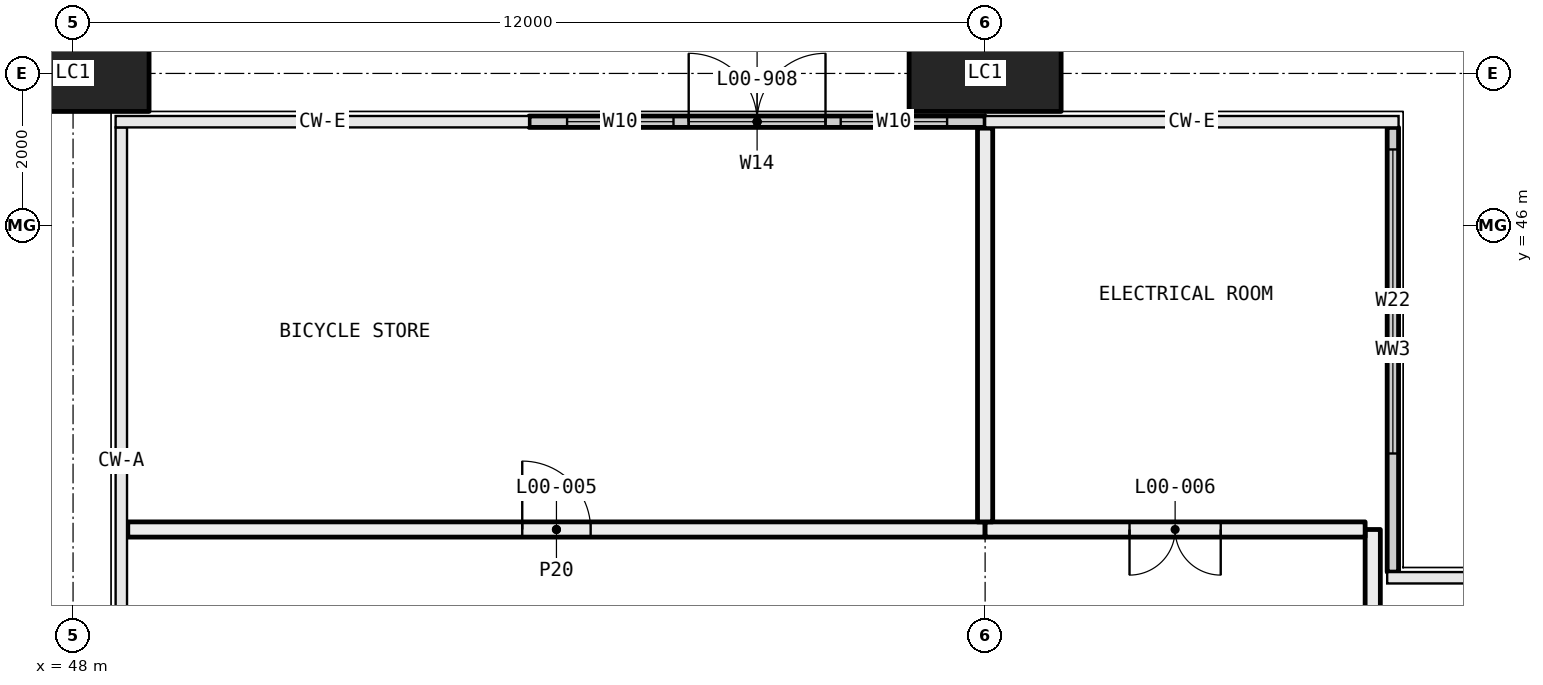
"""IFC4 building model, lengths in metres.
Left out: names, types, materials, properties, quantities, classifications, styles, units other than length and angle.
Written with IfcOpenShell. Run it as: python <this file> out.ifc"""

import sys

from ifc_helpers import new_model, si_unit, direction, frame, frame_2d, origin, origin_2d, place, context, subcontext, project, spatial, rectangle, hollow_rectangle, extrude, element, fill, save


model = new_model("IFC4")
c1 = context("Model", 3, precision=1e-05, world=origin(), true_north=direction((0.0, 1.0)))
c2 = subcontext(c1, "Body", "Model", "MODEL_VIEW")
j1 = project(units=[si_unit("LENGTHUNIT", "METRE"), si_unit("PLANEANGLEUNIT", "RADIAN")], contexts=[c1])
p1 = place(None, origin())
s1 = spatial("IfcSite", under=j1, at=p1, CompositionType="ELEMENT")
p2 = place(p1, origin())
s2 = spatial("IfcBuilding", under=s1, at=p2, CompositionType="ELEMENT")
p3 = place(p2, origin())
s3 = spatial("IfcBuildingStorey", under=s2, at=p3, CompositionType="ELEMENT", Elevation=0.0)
for number, where, z_axis, x_axis in (
    (1, (48.0, 48.0, -0.9), (0.0, 0.0, 1.0), (1.0, 0.0, 0.0)),
    (2, (60.0, 48.0, -0.9), (0.0, 0.0, 1.0), (1.0, 0.0, 0.0)),
):
    element("IfcColumn", number, at=place(p3, frame(where, z_axis=z_axis, x_axis=x_axis)), inside=s3, PredefinedType="COLUMN", context=c2, shape_type="SweptSolid", body=[
        extrude(hollow_rectangle(XDim=2.0, YDim=1.0, WallThickness=0.08, at=origin_2d()), origin(), (0.0, 0.0, 1.0), 6.5),
    ])
p4 = place(p3, frame((65.365, 41.44, 0.0), z_axis=(0.0, 0.0, 1.0), x_axis=(0.0, 1.0, 0.0)))
e3 = element("IfcWall", 3, at=p4, inside=s3, PredefinedType="ELEMENTEDWALL", context=c2, shape_type="SweptSolid", body=[
    extrude(rectangle(XDim=5.85, YDim=0.15, at=frame_2d((2.925, 0.0))), origin(), (0.0, 0.0, 1.0), 5.6),
])
p5 = place(p4, frame((1.56, 0.0, 0.45)))
e4 = element("IfcOpeningElement", 4, at=p5, cuts=e3, PredefinedType="OPENING", context=c2, shape_type="SweptSolid", body=[
    extrude(rectangle(XDim=4.0, YDim=5.1, at=frame_2d((2.0, 2.55))), frame((0.0, 0.085, 0.0), z_axis=(0.0, -1.0, 0.0), x_axis=(1.0, 0.0, 0.0)), (0.0, 0.0, 1.0), 0.17),
])
p6 = place(p3, frame((54.0, 47.365, 0.0), z_axis=(0.0, 0.0, 1.0), x_axis=(1.0, 0.0, 0.0)))
e5 = element("IfcWall", 5, at=p6, inside=s3, PredefinedType="ELEMENTEDWALL", context=c2, shape_type="SweptSolid", body=[
    extrude(rectangle(XDim=6.0, YDim=0.15, at=frame_2d((3.0, 0.0))), origin(), (0.0, 0.0, 1.0), 5.6),
])
p7 = place(p6, frame((0.5, 0.0, 0.45)))
e6 = element("IfcOpeningElement", 6, at=p7, cuts=e5, PredefinedType="OPENING", context=c2, shape_type="SweptSolid", body=[
    extrude(rectangle(XDim=1.4, YDim=5.1, at=frame_2d((0.7, 2.55))), frame((0.0, 0.085, 0.0), z_axis=(0.0, -1.0, 0.0), x_axis=(1.0, 0.0, 0.0)), (0.0, 0.0, 1.0), 0.17),
])
p8 = place(p6, frame((4.1, 0.0, 0.45)))
e7 = element("IfcOpeningElement", 7, at=p8, cuts=e5, PredefinedType="OPENING", context=c2, shape_type="SweptSolid", body=[
    extrude(rectangle(XDim=1.4, YDim=5.1, at=frame_2d((0.7, 2.55))), frame((0.0, 0.085, 0.0), z_axis=(0.0, -1.0, 0.0), x_axis=(1.0, 0.0, 0.0)), (0.0, 0.0, 1.0), 0.17),
])
p9 = place(p6, frame((2.1, 0.0, 0.0)))
e8 = element("IfcOpeningElement", 8, at=p9, cuts=e5, PredefinedType="OPENING", context=c2, shape_type="SweptSolid", body=[
    extrude(rectangle(XDim=1.8, YDim=2.4, at=frame_2d((0.9, 1.2))), frame((0.0, 0.085, 0.0), z_axis=(0.0, -1.0, 0.0), x_axis=(1.0, 0.0, 0.0)), (0.0, 0.0, 1.0), 0.17),
])
p10 = place(p6, frame((2.1, 0.0, 2.6)))
e9 = element("IfcOpeningElement", 9, at=p10, cuts=e5, PredefinedType="OPENING", context=c2, shape_type="SweptSolid", body=[
    extrude(rectangle(XDim=1.8, YDim=2.95, at=frame_2d((0.9, 1.475))), frame((0.0, 0.085, 0.0), z_axis=(0.0, -1.0, 0.0), x_axis=(1.0, 0.0, 0.0)), (0.0, 0.0, 1.0), 0.17),
])
p11 = place(p3, frame((65.1, 36.1, 0.0), z_axis=(0.0, 0.0, 1.0), x_axis=(0.0, 1.0, 0.0)))
e10 = element("IfcWall", 10, at=p11, inside=s3, PredefinedType="PARTITIONING", context=c2, shape_type="SweptSolid", body=[
    extrude(rectangle(XDim=5.9, YDim=0.2, at=frame_2d((2.95, 0.0))), origin(), (0.0, 0.0, 1.0), 5.6),
])
p12 = place(p3, frame((60.0, 42.0, 0.0), z_axis=(0.0, 0.0, 1.0), x_axis=(-1.0, 0.0, 0.0)))
e11 = element("IfcWall", 11, at=p12, inside=s3, PredefinedType="PARTITIONING", context=c2, shape_type="SweptSolid", body=[
    extrude(rectangle(XDim=11.28, YDim=0.2, at=frame_2d((5.64, 0.0))), origin(), (0.0, 0.0, 1.0), 5.6),
])
p13 = place(p12, frame((5.19, 0.0, 0.0)))
e12 = element("IfcOpeningElement", 12, at=p13, cuts=e11, PredefinedType="OPENING", context=c2, shape_type="SweptSolid", body=[
    extrude(rectangle(XDim=0.9, YDim=2.1, at=frame_2d((0.45, 1.05))), frame((0.0, 0.11, 0.0), z_axis=(0.0, -1.0, 0.0), x_axis=(1.0, 0.0, 0.0)), (0.0, 0.0, 1.0), 0.22),
])
p14 = place(p3, frame((65.0, 42.0, 0.0), z_axis=(0.0, 0.0, 1.0), x_axis=(-1.0, 0.0, 0.0)))
e13 = element("IfcWall", 13, at=p14, inside=s3, PredefinedType="PARTITIONING", context=c2, shape_type="SweptSolid", body=[
    extrude(rectangle(XDim=5.0, YDim=0.2, at=frame_2d((2.5, 0.0))), origin(), (0.0, 0.0, 1.0), 5.6),
])
p15 = place(p14, frame((1.9, 0.0, 0.0)))
e14 = element("IfcOpeningElement", 14, at=p15, cuts=e13, PredefinedType="OPENING", context=c2, shape_type="SweptSolid", body=[
    extrude(rectangle(XDim=1.2, YDim=2.1, at=frame_2d((0.6, 1.05))), frame((0.0, 0.11, 0.0), z_axis=(0.0, -1.0, 0.0), x_axis=(1.0, 0.0, 0.0)), (0.0, 0.0, 1.0), 0.22),
])
p16 = place(p3, frame((60.0, 42.1, 0.0), z_axis=(0.0, 0.0, 1.0), x_axis=(0.0, 1.0, 0.0)))
e15 = element("IfcWall", 15, at=p16, inside=s3, PredefinedType="PARTITIONING", context=c2, shape_type="SweptSolid", body=[
    extrude(rectangle(XDim=5.18, YDim=0.2, at=frame_2d((2.59, 0.0))), origin(), (0.0, 0.0, 1.0), 5.6),
])
p17 = place(p5, origin())
e16 = element("IfcWindow", 16, at=p17, inside=s3, PartitioningType="SINGLE_PANEL", PredefinedType="WINDOW", context=c2, shape_type="SweptSolid", body=[
    extrude(rectangle(XDim=4.0, YDim=5.1, at=frame_2d((2.0, 2.55))), frame((0.0, 0.03, 0.0), z_axis=(0.0, -1.0, 0.0), x_axis=(1.0, 0.0, 0.0)), (0.0, 0.0, 1.0), 0.06),
])
fill(e4, e16)
p18 = place(p7, origin())
e17 = element("IfcWindow", 17, at=p18, inside=s3, PartitioningType="SINGLE_PANEL", PredefinedType="WINDOW", context=c2, shape_type="SweptSolid", body=[
    extrude(rectangle(XDim=1.4, YDim=5.1, at=frame_2d((0.7, 2.55))), frame((0.0, 0.03, 0.0), z_axis=(0.0, -1.0, 0.0), x_axis=(1.0, 0.0, 0.0)), (0.0, 0.0, 1.0), 0.06),
])
fill(e6, e17)
p19 = place(p8, origin())
e18 = element("IfcWindow", 18, at=p19, inside=s3, PartitioningType="SINGLE_PANEL", PredefinedType="WINDOW", context=c2, shape_type="SweptSolid", body=[
    extrude(rectangle(XDim=1.4, YDim=5.1, at=frame_2d((0.7, 2.55))), frame((0.0, 0.03, 0.0), z_axis=(0.0, -1.0, 0.0), x_axis=(1.0, 0.0, 0.0)), (0.0, 0.0, 1.0), 0.06),
])
fill(e7, e18)
p20 = place(p9, origin())
e19 = element("IfcDoor", 19, at=p20, inside=s3, OperationType="DOUBLE_DOOR_SINGLE_SWING", PredefinedType="DOOR", context=c2, shape_type="SweptSolid", body=[
    extrude(rectangle(XDim=1.8, YDim=2.4, at=frame_2d((0.9, 1.2))), frame((0.0, 0.025, 0.0), z_axis=(0.0, -1.0, 0.0), x_axis=(1.0, 0.0, 0.0)), (0.0, 0.0, 1.0), 0.05),
])
fill(e8, e19)
p21 = place(p10, origin())
e20 = element("IfcWindow", 20, at=p21, inside=s3, PartitioningType="SINGLE_PANEL", PredefinedType="WINDOW", context=c2, shape_type="SweptSolid", body=[
    extrude(rectangle(XDim=1.8, YDim=2.95, at=frame_2d((0.9, 1.475))), frame((0.0, 0.03, 0.0), z_axis=(0.0, -1.0, 0.0), x_axis=(1.0, 0.0, 0.0)), (0.0, 0.0, 1.0), 0.06),
])
fill(e9, e20)
p22 = place(p13, frame((0.9, 0.0, 0.0), x_axis=(-1.0, 0.0, 0.0)))
e21 = element("IfcDoor", 21, at=p22, inside=s3, OperationType="SINGLE_SWING_RIGHT", PredefinedType="DOOR", context=c2, shape_type="SweptSolid", body=[
    extrude(rectangle(XDim=0.9, YDim=2.1, at=frame_2d((0.45, 1.05))), frame((0.0, 0.025, 0.0), z_axis=(0.0, -1.0, 0.0), x_axis=(1.0, 0.0, 0.0)), (0.0, 0.0, 1.0), 0.05),
])
fill(e12, e21)
p23 = place(p15, origin())
e22 = element("IfcDoor", 22, at=p23, inside=s3, OperationType="DOUBLE_DOOR_SINGLE_SWING", PredefinedType="DOOR", context=c2, shape_type="SweptSolid", body=[
    extrude(rectangle(XDim=1.2, YDim=2.1, at=frame_2d((0.6, 1.05))), frame((0.0, 0.025, 0.0), z_axis=(0.0, -1.0, 0.0), x_axis=(1.0, 0.0, 0.0)), (0.0, 0.0, 1.0), 0.05),
])
fill(e14, e22)
save(model, sys.argv[1])
